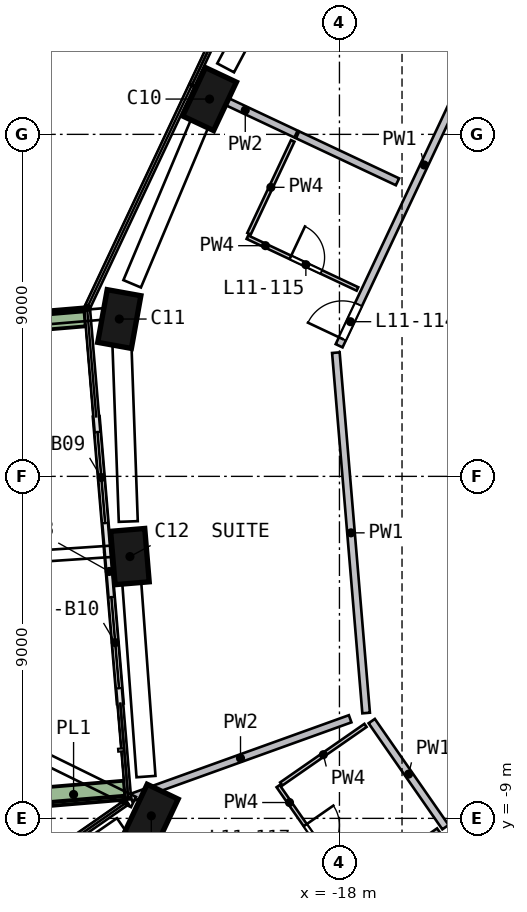
"""IFC4 building model, lengths in metres.
Left out: names, types, materials, properties, quantities, classifications, styles, units other than length and angle.
Written with IfcOpenShell. Run it as: python <this file> out.ifc"""

import sys

from ifc_helpers import new_model, si_unit, direction, frame, frame_2d, origin, origin_2d, place, context, subcontext, project, spatial, rectangle, extrude, element, fill, save


model = new_model("IFC4")
c1 = context("Model", 3, precision=1e-05, world=origin(), true_north=direction((0.0, 1.0)))
c2 = subcontext(c1, "Body", "Model", "MODEL_VIEW")
j1 = project(units=[si_unit("LENGTHUNIT", "METRE"), si_unit("PLANEANGLEUNIT", "RADIAN")], contexts=[c1])
p1 = place(None, origin())
s1 = spatial("IfcSite", under=j1, at=p1, CompositionType="ELEMENT")
p2 = place(p1, origin())
s2 = spatial("IfcBuilding", under=s1, at=p2, CompositionType="ELEMENT")
p3 = place(p2, frame((0.0, 0.0, 53.0)))
s3 = spatial("IfcBuildingStorey", under=s2, at=p3, CompositionType="ELEMENT", Elevation=53.0)
p4 = place(p3, frame((-21.362, 10.052, 0.0), z_axis=(-0.046923296, -0.10198402, 0.993678753), x_axis=(-0.422986653, -0.899155521, -0.112257027)))
e1 = element("IfcColumn", 1, at=p4, inside=s3, PredefinedType="COLUMN", context=c2, shape_type="SweptSolid", body=[
    extrude(rectangle(XDim=1.4, YDim=0.9, at=origin_2d()), origin(), (0.0, 0.0, 1.0), 3.21),
])
p5 = place(p3, frame((-23.77, 4.277, 0.0), z_axis=(-0.019387151, -0.113205755, 0.993382401), x_axis=(0.17598777, 0.977669596, 0.114849756)))
e2 = element("IfcColumn", 2, at=p5, inside=s3, PredefinedType="COLUMN", context=c2, shape_type="SweptSolid", body=[
    extrude(rectangle(XDim=1.4, YDim=0.9, at=origin_2d()), origin(), (0.0, 0.0, 1.0), 3.211),
])
p6 = place(p3, frame((-23.525, -1.976, 0.0), z_axis=(0.010266843, -0.111794513, 0.993678307), x_axis=(0.082474278, -0.990250205, -0.11226097)))
e3 = element("IfcColumn", 3, at=p6, inside=s3, PredefinedType="COLUMN", context=c2, shape_type="SweptSolid", body=[
    extrude(rectangle(XDim=1.4, YDim=0.9, at=origin_2d()), origin(), (0.0, 0.0, 1.0), 3.21),
])
p7 = place(p3, frame((-23.002, -8.802, 0.0), z_axis=(0.042792513, -0.108995494, 0.993120729), x_axis=(0.430367441, 0.899089989, 0.0801315)))
e4 = element("IfcColumn", 4, at=p7, inside=s3, PredefinedType="COLUMN", context=c2, shape_type="SweptSolid", body=[
    extrude(rectangle(XDim=1.4, YDim=0.9, at=origin_2d()), origin(), (0.0, 0.0, 1.0), 3.212),
])
p8 = place(p3, frame((-24.4, 1.564, 0.0), z_axis=(0.0, 0.0, 1.0), x_axis=(0.083617932, -0.996497888, 0.0)))
e5 = element("IfcWall", 5, at=p8, inside=s3, PredefinedType="SOLIDWALL", context=c2, shape_type="SweptSolid", body=[
    extrude(rectangle(XDim=3.6, YDim=0.15, at=frame_2d((1.8, 0.0))), origin(), (0.0, 0.0, 1.0), 2.425),
])
p9 = place(p8, frame((0.4, 0.0, 0.0)))
e6 = element("IfcOpeningElement", 6, at=p9, cuts=e5, PredefinedType="OPENING", context=c2, shape_type="SweptSolid", body=[
    extrude(rectangle(XDim=2.4, YDim=2.4, at=frame_2d((1.2, 1.2))), frame((0.0, 0.085, 0.0), z_axis=(0.0, -1.0, 0.0), x_axis=(1.0, 0.0, 0.0)), (0.0, 0.0, 1.0), 0.17),
])
p10 = place(p3, frame((-24.099, -2.024, 0.0), z_axis=(0.0, 0.0, 1.0), x_axis=(0.083713777, -0.996489841, 0.0)))
e7 = element("IfcWall", 7, at=p10, inside=s3, PredefinedType="SOLIDWALL", context=c2, shape_type="SweptSolid", body=[
    extrude(rectangle(XDim=3.96, YDim=0.15, at=frame_2d((1.98, 0.0))), origin(), (0.0, 0.0, 1.0), 2.425),
])
p11 = place(p10, frame((1.16, 0.0, 0.0)))
e8 = element("IfcOpeningElement", 8, at=p11, cuts=e7, PredefinedType="OPENING", context=c2, shape_type="SweptSolid", body=[
    extrude(rectangle(XDim=2.4, YDim=2.4, at=frame_2d((1.2, 1.2))), frame((0.0, 0.085, 0.0), z_axis=(0.0, -1.0, 0.0), x_axis=(1.0, 0.0, 0.0)), (0.0, 0.0, 1.0), 0.17),
])
p12 = place(p3, frame((-24.697, 4.198, 0.0), z_axis=(0.0, 0.0, 1.0), x_axis=(-0.996495576, -0.083645489, 0.0)))
e9 = element("IfcWall", 9, at=p12, inside=s3, PredefinedType="SOLIDWALL", context=c2, shape_type="SweptSolid", body=[
    extrude(rectangle(XDim=3.199, YDim=0.5, at=frame_2d((1.6, 0.0))), origin(), (0.0, 0.0, 1.0), 0.7),
])
p13 = place(p3, frame((-26.341, -8.484, 0.0), z_axis=(0.0, 0.0, 1.0), x_axis=(0.996493156, 0.083674307, 0.0)))
e10 = element("IfcWall", 10, at=p13, inside=s3, PredefinedType="SOLIDWALL", context=c2, shape_type="SweptSolid", body=[
    extrude(rectangle(XDim=2.699, YDim=0.5, at=frame_2d((1.35, 0.0))), origin(), (0.0, 0.0, 1.0), 0.7),
])
p14 = place(p3, frame((-26.832, -17.309, 0.0), z_axis=(0.0, 0.0, 1.0), x_axis=(0.821145147, 0.570719412, 0.0)))
e11 = element("IfcWall", 11, at=p14, inside=s3, PredefinedType="SOLIDWALL", context=c2, shape_type="SweptSolid", body=[
    extrude(rectangle(XDim=13.953, YDim=0.2, at=frame_2d((6.977, 0.0))), origin(), (0.0, 0.0, 1.0), 3.19),
])
p15 = place(p14, frame((6.1, 0.0, 0.0)))
e12 = element("IfcOpeningElement", 12, at=p15, cuts=e11, PredefinedType="OPENING", context=c2, shape_type="SweptSolid", body=[
    extrude(rectangle(XDim=1.0, YDim=2.1, at=frame_2d((0.5, 1.05))), frame((0.0, 0.11, 0.0), z_axis=(0.0, -1.0, 0.0), x_axis=(1.0, 0.0, 0.0)), (0.0, 0.0, 1.0), 0.22),
])
p16 = place(p3, frame((-18.094, 3.255, 0.0), z_axis=(0.0, 0.0, 1.0), x_axis=(0.083688801, -0.996491939, 0.0)))
e13 = element("IfcWall", 13, at=p16, inside=s3, PredefinedType="SOLIDWALL", context=c2, shape_type="SweptSolid", body=[
    extrude(rectangle(XDim=9.516, YDim=0.2, at=frame_2d((4.758, 0.0))), origin(), (0.0, 0.0, 1.0), 3.19),
])
p17 = place(p3, frame((-17.15, -6.44, 0.0), z_axis=(0.0, 0.0, 1.0), x_axis=(0.570654154, -0.8211905, 0.0)))
e14 = element("IfcWall", 14, at=p17, inside=s3, PredefinedType="SOLIDWALL", context=c2, shape_type="SweptSolid", body=[
    extrude(rectangle(XDim=3.4, YDim=0.2, at=frame_2d((1.7, 0.0))), origin(), (0.0, 0.0, 1.0), 3.19),
])
p18 = place(p3, frame((-18.009, 3.437, 0.0), z_axis=(0.0, 0.0, 1.0), x_axis=(0.42576737, 0.904832662, 0.0)))
e15 = element("IfcWall", 15, at=p18, inside=s3, PredefinedType="SOLIDWALL", context=c2, shape_type="SweptSolid", body=[
    extrude(rectangle(XDim=9.115, YDim=0.2, at=frame_2d((4.558, 0.0))), origin(), (0.0, 0.0, 1.0), 3.19),
])
p19 = place(p18, frame((0.2, 0.0, 0.0)))
e16 = element("IfcOpeningElement", 16, at=p19, cuts=e15, PredefinedType="OPENING", context=c2, shape_type="SweptSolid", body=[
    extrude(rectangle(XDim=1.0, YDim=2.1, at=frame_2d((0.5, 1.05))), frame((0.0, 0.11, 0.0), z_axis=(0.0, -1.0, 0.0), x_axis=(1.0, 0.0, 0.0)), (0.0, 0.0, 1.0), 0.22),
])
p20 = place(p3, frame((-17.719, -6.379, 0.0), z_axis=(0.0, 0.0, 1.0), x_axis=(-0.940881321, -0.338736386, 0.0)))
e17 = element("IfcWall", 17, at=p20, inside=s3, PredefinedType="SOLIDWALL", context=c2, shape_type="SweptSolid", body=[
    extrude(rectangle(XDim=6.132, YDim=0.2, at=frame_2d((3.066, 0.0))), origin(), (0.0, 0.0, 1.0), 3.19),
])
p21 = place(p3, frame((-19.143, 9.008, 0.0), z_axis=(0.0, 0.0, 1.0), x_axis=(-0.904794334, 0.425848814, 0.0)))
e18 = element("IfcWall", 18, at=p21, inside=s3, PredefinedType="SOLIDWALL", context=c2, shape_type="SweptSolid", body=[
    extrude(rectangle(XDim=2.952, YDim=0.2, at=frame_2d((1.476, 0.0))), origin(), (0.0, 0.0, 1.0), 3.19),
])
p22 = place(p3, frame((-16.473, 7.752, 0.0), z_axis=(0.0, 0.0, 1.0), x_axis=(-0.904862507, 0.425703938, 0.0)))
e19 = element("IfcWall", 19, at=p22, inside=s3, PredefinedType="SOLIDWALL", context=c2, shape_type="SweptSolid", body=[
    extrude(rectangle(XDim=2.905, YDim=0.2, at=frame_2d((1.452, 0.0))), origin(), (0.0, 0.0, 1.0), 3.19),
])
p23 = place(p3, frame((-20.379, 6.385, 0.0), z_axis=(0.0, 0.0, 1.0), x_axis=(0.425783973, 0.90482485, 0.0)))
e20 = element("IfcWall", 20, at=p23, inside=s3, PredefinedType="PARTITIONING", context=c2, shape_type="SweptSolid", body=[
    extrude(rectangle(XDim=2.7, YDim=0.1, at=frame_2d((1.35, 0.0))), origin(), (0.0, 0.0, 1.0), 3.19),
])
p24 = place(p3, frame((-20.422, 6.294, 0.0), z_axis=(0.0, 0.0, 1.0), x_axis=(0.90485328, -0.42572355, 0.0)))
e21 = element("IfcWall", 21, at=p24, inside=s3, PredefinedType="PARTITIONING", context=c2, shape_type="SweptSolid", body=[
    extrude(rectangle(XDim=3.2, YDim=0.1, at=frame_2d((1.6, 0.0))), origin(), (0.0, 0.0, 1.0), 3.19),
])
p25 = place(p24, frame((1.25, 0.0, 0.0)))
e22 = element("IfcOpeningElement", 22, at=p25, cuts=e21, PredefinedType="OPENING", context=c2, shape_type="SweptSolid", body=[
    extrude(rectangle(XDim=0.9, YDim=2.1, at=frame_2d((0.45, 1.05))), frame((0.0, 0.06, 0.0), z_axis=(0.0, -1.0, 0.0), x_axis=(1.0, 0.0, 0.0)), (0.0, 0.0, 1.0), 0.12),
])
p26 = place(p3, frame((-19.614, -8.152, 0.0), z_axis=(0.0, 0.0, 1.0), x_axis=(0.570740324, -0.821130612, 0.0)))
e23 = element("IfcWall", 23, at=p26, inside=s3, PredefinedType="PARTITIONING", context=c2, shape_type="SweptSolid", body=[
    extrude(rectangle(XDim=3.2, YDim=0.1, at=frame_2d((1.6, 0.0))), origin(), (0.0, 0.0, 1.0), 3.19),
])
p27 = place(p26, frame((1.25, 0.0, 0.0)))
e24 = element("IfcOpeningElement", 24, at=p27, cuts=e23, PredefinedType="OPENING", context=c2, shape_type="SweptSolid", body=[
    extrude(rectangle(XDim=0.9, YDim=2.1, at=frame_2d((0.45, 1.05))), frame((0.0, 0.06, 0.0), z_axis=(0.0, -1.0, 0.0), x_axis=(1.0, 0.0, 0.0)), (0.0, 0.0, 1.0), 0.12),
])
p28 = place(p3, frame((-19.532, -8.095, 0.0), z_axis=(0.0, 0.0, 1.0), x_axis=(0.821168678, 0.570685555, 0.0)))
e25 = element("IfcWall", 25, at=p28, inside=s3, PredefinedType="PARTITIONING", context=c2, shape_type="SweptSolid", body=[
    extrude(rectangle(XDim=2.7, YDim=0.1, at=frame_2d((1.35, 0.0))), origin(), (0.0, 0.0, 1.0), 3.19),
])
p29 = place(p9, origin())
e26 = element("IfcDoor", 26, at=p29, inside=s3, OperationType="SLIDING_TO_RIGHT", PredefinedType="DOOR", context=c2, shape_type="SweptSolid", body=[
    extrude(rectangle(XDim=2.4, YDim=2.4, at=frame_2d((1.2, 1.2))), frame((0.0, 0.025, 0.0), z_axis=(0.0, -1.0, 0.0), x_axis=(1.0, 0.0, 0.0)), (0.0, 0.0, 1.0), 0.05),
])
fill(e6, e26)
p30 = place(p11, origin())
e27 = element("IfcDoor", 27, at=p30, inside=s3, OperationType="SLIDING_TO_LEFT", PredefinedType="DOOR", context=c2, shape_type="SweptSolid", body=[
    extrude(rectangle(XDim=2.4, YDim=2.4, at=frame_2d((1.2, 1.2))), frame((0.0, 0.025, 0.0), z_axis=(0.0, -1.0, 0.0), x_axis=(1.0, 0.0, 0.0)), (0.0, 0.0, 1.0), 0.05),
])
fill(e8, e27)
p31 = place(p19, origin())
e28 = element("IfcDoor", 28, at=p31, inside=s3, OperationType="SINGLE_SWING_LEFT", PredefinedType="DOOR", context=c2, shape_type="SweptSolid", body=[
    extrude(rectangle(XDim=1.0, YDim=2.1, at=frame_2d((0.5, 1.05))), frame((0.0, 0.025, 0.0), z_axis=(0.0, -1.0, 0.0), x_axis=(1.0, 0.0, 0.0)), (0.0, 0.0, 1.0), 0.05),
])
fill(e16, e28)
p32 = place(p25, origin())
e29 = element("IfcDoor", 29, at=p32, inside=s3, OperationType="SINGLE_SWING_LEFT", PredefinedType="DOOR", context=c2, shape_type="SweptSolid", body=[
    extrude(rectangle(XDim=0.9, YDim=2.1, at=frame_2d((0.45, 1.05))), frame((0.0, 0.025, 0.0), z_axis=(0.0, -1.0, 0.0), x_axis=(1.0, 0.0, 0.0)), (0.0, 0.0, 1.0), 0.05),
])
fill(e22, e29)
p33 = place(p27, origin())
e30 = element("IfcDoor", 30, at=p33, inside=s3, OperationType="SINGLE_SWING_LEFT", PredefinedType="DOOR", context=c2, shape_type="SweptSolid", body=[
    extrude(rectangle(XDim=0.9, YDim=2.1, at=frame_2d((0.45, 1.05))), frame((0.0, 0.025, 0.0), z_axis=(0.0, -1.0, 0.0), x_axis=(1.0, 0.0, 0.0)), (0.0, 0.0, 1.0), 0.05),
])
fill(e24, e30)
save(model, sys.argv[1])
